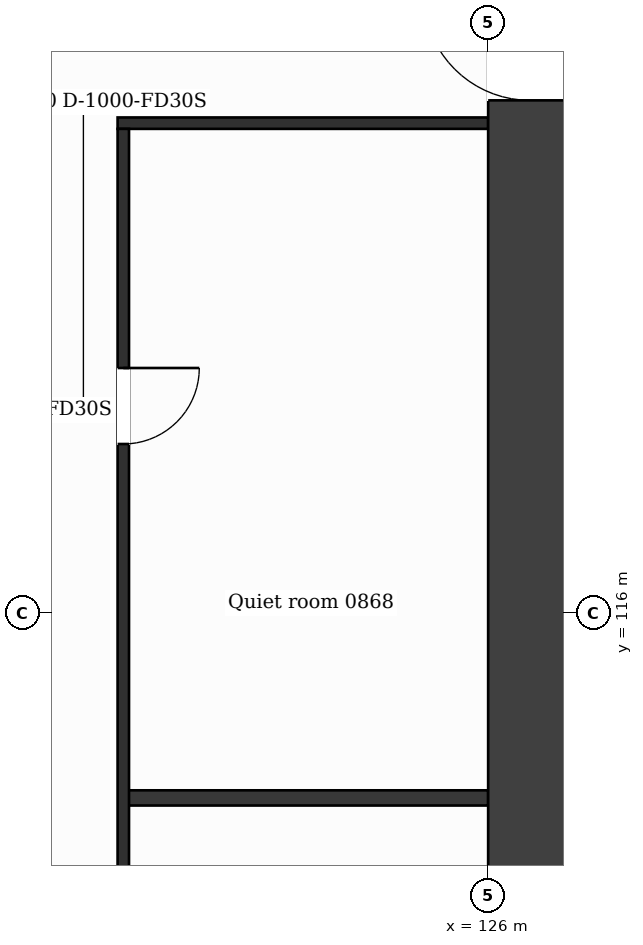
"""IFC4 building model, lengths in metres.
Left out: names, types, materials, properties, quantities, classifications, styles, units other than length and angle.
Written with IfcOpenShell. Run it as: python <this file> out.ifc"""

import sys

from ifc_helpers import new_model, si_unit, direction, frame, frame_2d, origin, place, context, subcontext, project, spatial, rectangle, extrude, element, fill, save


model = new_model("IFC4")
c1 = context("Model", 3, precision=1e-05, world=origin(), true_north=direction((0.0, 1.0)))
c2 = subcontext(c1, "Body", "Model", "MODEL_VIEW")
j1 = project(units=[si_unit("LENGTHUNIT", "METRE"), si_unit("PLANEANGLEUNIT", "RADIAN")], contexts=[c1])
p1 = place(None, origin())
s1 = spatial("IfcSite", under=j1, at=p1, CompositionType="ELEMENT")
p2 = place(p1, origin())
s2 = spatial("IfcBuilding", under=s1, at=p2, CompositionType="ELEMENT")
p3 = place(p2, frame((0.0, 0.0, 46.0)))
s3 = spatial("IfcBuildingStorey", under=s2, at=p3, CompositionType="ELEMENT", Elevation=46.0)
p4 = place(p3, frame((126.55, 110.95, 0.0), z_axis=(0.0, 0.0, 1.0), x_axis=(0.0, 1.0, 0.0)))
e1 = element("IfcWall", 1, at=p4, inside=s3, PredefinedType="SHEAR", context=c2, shape_type="SweptSolid", body=[
    extrude(rectangle(XDim=20.9, YDim=1.1, at=frame_2d((10.45, 0.0))), origin(), (0.0, 0.0, 1.0), 3.5),
])
p5 = place(p4, frame((11.8, 0.0, 0.0)))
e2 = element("IfcOpeningElement", 2, at=p5, cuts=e1, PredefinedType="OPENING", context=c2, shape_type="SweptSolid", body=[
    extrude(rectangle(XDim=1.4, YDim=2.1, at=frame_2d((0.7, 1.05))), frame((0.0, 0.56, 0.0), z_axis=(0.0, -1.0, 0.0), x_axis=(1.0, 0.0, 0.0)), (0.0, 0.0, 1.0), 1.12),
])
p6 = place(p3, frame((121.2, 113.573, 0.0), z_axis=(0.0, 0.0, 1.0), x_axis=(1.0, 0.0, 0.0)))
e3 = element("IfcWall", 3, at=p6, inside=s3, PredefinedType="PARTITIONING", context=c2, shape_type="SweptSolid", body=[
    extrude(rectangle(XDim=4.8, YDim=0.2, at=frame_2d((2.4, 0.0))), origin(), (0.0, 0.0, 1.0), 3.18),
])
p7 = place(p3, frame((121.125, 122.45, 0.0), z_axis=(0.0, 0.0, 1.0), x_axis=(1.0, 0.0, 0.0)))
e4 = element("IfcWall", 4, at=p7, inside=s3, PredefinedType="PARTITIONING", context=c2, shape_type="SweptSolid", body=[
    extrude(rectangle(XDim=4.875, YDim=0.15, at=frame_2d((2.438, 0.0))), origin(), (0.0, 0.0, 1.0), 3.18),
])
p8 = place(p3, frame((121.2, 109.075, 0.0), z_axis=(0.0, 0.0, 1.0), x_axis=(0.0, 1.0, 0.0)))
e5 = element("IfcWall", 5, at=p8, inside=s3, PredefinedType="PARTITIONING", context=c2, shape_type="SweptSolid", body=[
    extrude(rectangle(XDim=13.3, YDim=0.15, at=frame_2d((6.65, 0.0))), origin(), (0.0, 0.0, 1.0), 3.18),
])
p9 = place(p8, frame((9.154, 0.0, 0.0)))
e6 = element("IfcOpeningElement", 6, at=p9, cuts=e5, PredefinedType="OPENING", context=c2, shape_type="SweptSolid", body=[
    extrude(rectangle(XDim=1.0, YDim=2.1, at=frame_2d((0.5, 1.05))), frame((0.0, 0.085, 0.0), z_axis=(0.0, -1.0, 0.0), x_axis=(1.0, 0.0, 0.0)), (0.0, 0.0, 1.0), 0.17),
])
p10 = place(p9, origin())
e7 = element("IfcDoor", 7, at=p10, inside=s3, OperationType="SINGLE_SWING_RIGHT", PredefinedType="DOOR", context=c2, shape_type="SweptSolid", body=[
    extrude(rectangle(XDim=1.0, YDim=2.1, at=frame_2d((0.5, 1.05))), frame((0.0, 0.025, 0.0), z_axis=(0.0, -1.0, 0.0), x_axis=(1.0, 0.0, 0.0)), (0.0, 0.0, 1.0), 0.05),
])
fill(e6, e7)
p11 = place(p5, origin())
e8 = element("IfcDoor", 8, at=p11, inside=s3, OperationType="SINGLE_SWING_RIGHT", PredefinedType="DOOR", context=c2, shape_type="SweptSolid", body=[
    extrude(rectangle(XDim=1.4, YDim=2.1, at=frame_2d((0.7, 1.05))), frame((0.0, 0.025, 0.0), z_axis=(0.0, -1.0, 0.0), x_axis=(1.0, 0.0, 0.0)), (0.0, 0.0, 1.0), 0.05),
])
fill(e2, e8)
save(model, sys.argv[1])
